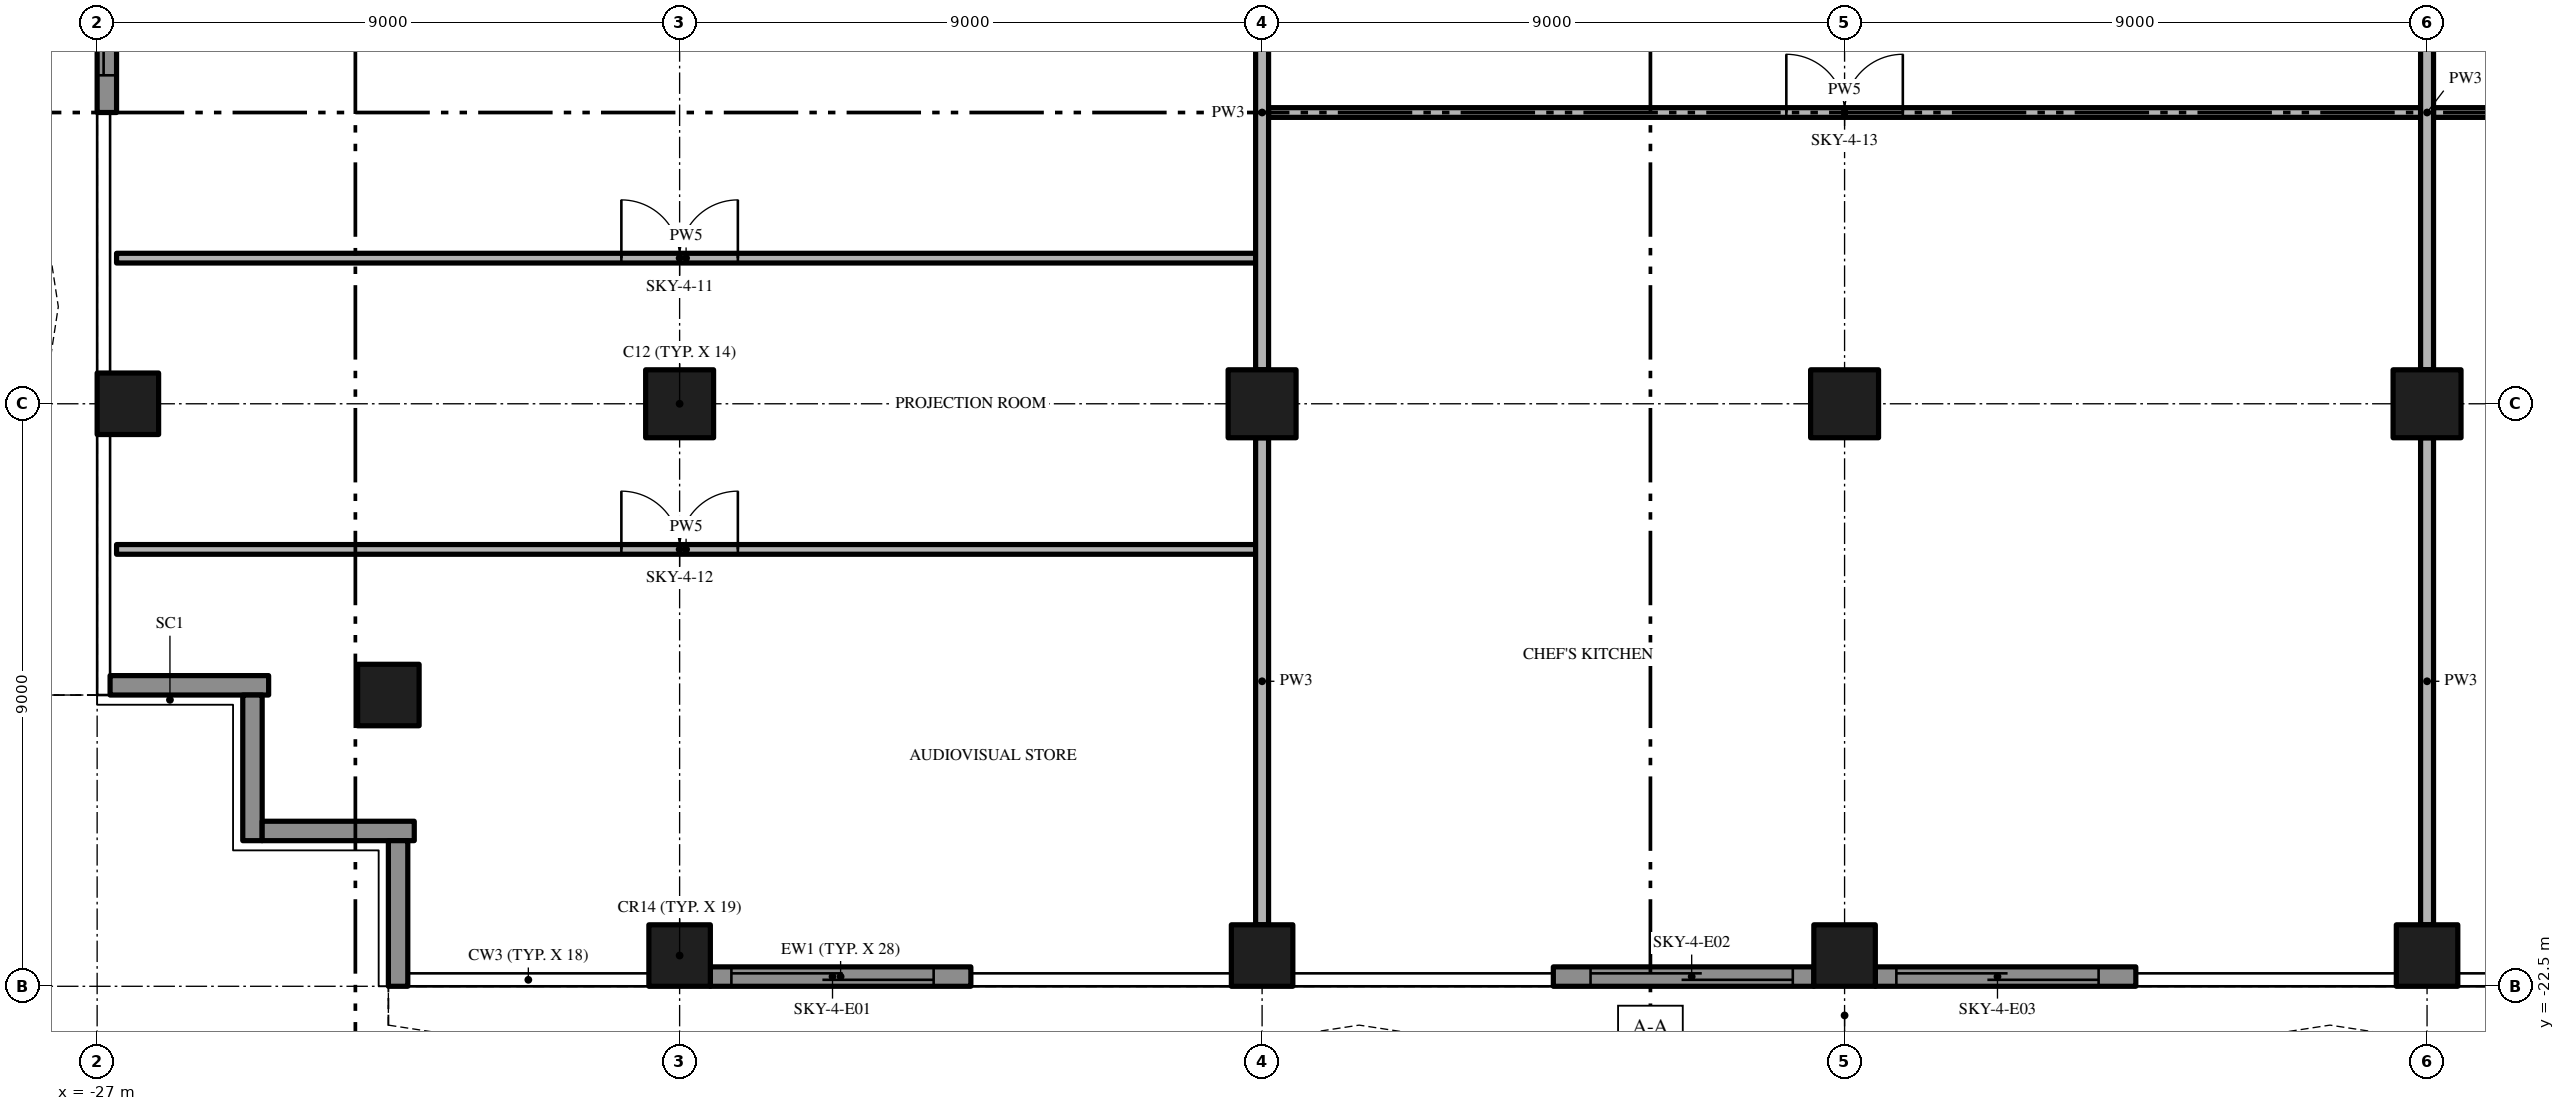
"""IFC4 building model, lengths in metres.
Left out: names, types, materials, properties, quantities, classifications, styles, units other than length and angle.
Written with IfcOpenShell. Run it as: python <this file> out.ifc"""

import sys

from ifc_helpers import new_model, si_unit, direction, frame, frame_2d, origin, origin_2d, place, context, subcontext, project, spatial, polyline, rectangle, outline, extrude, element, fill, save


model = new_model("IFC4")
c1 = context("Model", 3, precision=1e-05, world=origin(), true_north=direction((0.0, 1.0)))
c2 = subcontext(c1, "Body", "Model", "MODEL_VIEW")
j1 = project(units=[si_unit("LENGTHUNIT", "METRE"), si_unit("PLANEANGLEUNIT", "RADIAN")], contexts=[c1])
p1 = place(None, origin())
s1 = spatial("IfcSite", under=j1, at=p1, CompositionType="ELEMENT")
p2 = place(p1, origin())
s2 = spatial("IfcBuilding", under=s1, at=p2, CompositionType="ELEMENT")
p3 = place(p2, frame((0.0, 0.0, 233.8)))
s3 = spatial("IfcBuildingStorey", under=s2, at=p3, CompositionType="ELEMENT", Elevation=233.8)
p4 = place(p3, frame((-18.0, -13.5, 0.0), z_axis=(0.0, 0.0, 1.0), x_axis=(1.0, 0.0, 0.0)))
e1 = element("IfcColumn", 1, at=p4, inside=s3, PredefinedType="COLUMN", context=c2, shape_type="SweptSolid", body=[
    extrude(rectangle(XDim=1.05, YDim=1.05, at=origin_2d()), origin(), (0.0, 0.0, 1.0), 4.7),
])
for number, where, z_axis, x_axis in (
    (2, (-18.0, -22.025, 0.0), (0.0, 0.0, 1.0), (1.0, 0.0, 0.0)),
    (3, (-26.525, -13.5, 0.0), (0.0, 0.0, 1.0), (1.0, 0.0, 0.0)),
    (4, (-22.5, -18.0, 0.0), (0.0, 0.0, 1.0), (1.0, 0.0, 0.0)),
):
    element("IfcColumn", number, at=place(p3, frame(where, z_axis=z_axis, x_axis=x_axis)), inside=s3, PredefinedType="COLUMN", context=c2, shape_type="SweptSolid", body=[
        extrude(rectangle(XDim=0.95, YDim=0.95, at=origin_2d()), origin(), (0.0, 0.0, 1.0), 4.7),
    ])
p5 = place(p3, frame((-9.0, -13.5, 0.0), z_axis=(0.0, 0.0, 1.0), x_axis=(1.0, 0.0, 0.0)))
e5 = element("IfcColumn", 5, at=p5, inside=s3, PredefinedType="COLUMN", context=c2, shape_type="SweptSolid", body=[
    extrude(rectangle(XDim=1.05, YDim=1.05, at=origin_2d()), origin(), (0.0, 0.0, 1.0), 4.7),
])
p6 = place(p3, frame((-9.0, -22.025, 0.0), z_axis=(0.0, 0.0, 1.0), x_axis=(1.0, 0.0, 0.0)))
e6 = element("IfcColumn", 6, at=p6, inside=s3, PredefinedType="COLUMN", context=c2, shape_type="SweptSolid", body=[
    extrude(rectangle(XDim=0.95, YDim=0.95, at=origin_2d()), origin(), (0.0, 0.0, 1.0), 4.7),
])
p7 = place(p3, frame((0.0, -13.5, 0.0), z_axis=(0.0, 0.0, 1.0), x_axis=(1.0, 0.0, 0.0)))
e7 = element("IfcColumn", 7, at=p7, inside=s3, PredefinedType="COLUMN", context=c2, shape_type="SweptSolid", body=[
    extrude(rectangle(XDim=1.05, YDim=1.05, at=origin_2d()), origin(), (0.0, 0.0, 1.0), 4.7),
])
p8 = place(p3, frame((0.0, -22.025, 0.0), z_axis=(0.0, 0.0, 1.0), x_axis=(1.0, 0.0, 0.0)))
e8 = element("IfcColumn", 8, at=p8, inside=s3, PredefinedType="COLUMN", context=c2, shape_type="SweptSolid", body=[
    extrude(rectangle(XDim=0.95, YDim=0.95, at=origin_2d()), origin(), (0.0, 0.0, 1.0), 4.7),
])
p9 = place(p3, frame((9.0, -13.5, 0.0), z_axis=(0.0, 0.0, 1.0), x_axis=(1.0, 0.0, 0.0)))
e9 = element("IfcColumn", 9, at=p9, inside=s3, PredefinedType="COLUMN", context=c2, shape_type="SweptSolid", body=[
    extrude(rectangle(XDim=1.05, YDim=1.05, at=origin_2d()), origin(), (0.0, 0.0, 1.0), 4.7),
])
p10 = place(p3, frame((9.0, -22.025, 0.0), z_axis=(0.0, 0.0, 1.0), x_axis=(1.0, 0.0, 0.0)))
e10 = element("IfcColumn", 10, at=p10, inside=s3, PredefinedType="COLUMN", context=c2, shape_type="SweptSolid", body=[
    extrude(rectangle(XDim=0.95, YDim=0.95, at=origin_2d()), origin(), (0.0, 0.0, 1.0), 4.7),
])
p11 = place(p3, frame((-13.5, -22.35, 0.0), z_axis=(0.0, 0.0, 1.0), x_axis=(-1.0, 0.0, 0.0)))
e11 = element("IfcWall", 11, at=p11, inside=s3, PredefinedType="SOLIDWALL", context=c2, shape_type="SweptSolid", body=[
    extrude(rectangle(XDim=4.025, YDim=0.3, at=frame_2d((2.013, 0.0))), origin(), (0.0, 0.0, 1.0), 4.7),
])
p12 = place(p11, frame((0.575, 0.0, 0.0)))
e12 = element("IfcOpeningElement", 12, at=p12, cuts=e11, PredefinedType="OPENING", context=c2, shape_type="SweptSolid", body=[
    extrude(rectangle(XDim=3.125, YDim=2.4, at=frame_2d((1.562, 1.2))), frame((0.0, 0.16, 0.0), z_axis=(0.0, -1.0, 0.0), x_axis=(1.0, 0.0, 0.0)), (0.0, 0.0, 1.0), 0.32),
])
p13 = place(p3, frame((-0.475, -22.35, 0.0), z_axis=(0.0, 0.0, 1.0), x_axis=(-1.0, 0.0, 0.0)))
e13 = element("IfcWall", 13, at=p13, inside=s3, PredefinedType="SOLIDWALL", context=c2, shape_type="SweptSolid", body=[
    extrude(rectangle(XDim=4.025, YDim=0.3, at=frame_2d((2.013, 0.0))), origin(), (0.0, 0.0, 1.0), 4.7),
])
p14 = place(p13, frame((0.325, 0.0, 0.0)))
e14 = element("IfcOpeningElement", 14, at=p14, cuts=e13, PredefinedType="OPENING", context=c2, shape_type="SweptSolid", body=[
    extrude(rectangle(XDim=3.125, YDim=2.4, at=frame_2d((1.562, 1.2))), frame((0.0, 0.16, 0.0), z_axis=(0.0, -1.0, 0.0), x_axis=(1.0, 0.0, 0.0)), (0.0, 0.0, 1.0), 0.32),
])
p15 = place(p3, frame((4.5, -22.35, 0.0), z_axis=(0.0, 0.0, 1.0), x_axis=(-1.0, 0.0, 0.0)))
e15 = element("IfcWall", 15, at=p15, inside=s3, PredefinedType="SOLIDWALL", context=c2, shape_type="SweptSolid", body=[
    extrude(rectangle(XDim=4.025, YDim=0.3, at=frame_2d((2.013, 0.0))), origin(), (0.0, 0.0, 1.0), 4.7),
])
p16 = place(p15, frame((0.575, 0.0, 0.0)))
e16 = element("IfcOpeningElement", 16, at=p16, cuts=e15, PredefinedType="OPENING", context=c2, shape_type="SweptSolid", body=[
    extrude(rectangle(XDim=3.125, YDim=2.4, at=frame_2d((1.562, 1.2))), frame((0.0, 0.16, 0.0), z_axis=(0.0, -1.0, 0.0), x_axis=(1.0, 0.0, 0.0)), (0.0, 0.0, 1.0), 0.32),
])
p17 = place(p3, frame((-26.85, -9.0, 0.0), z_axis=(0.0, 0.0, 1.0), x_axis=(0.0, 1.0, 0.0)))
e17 = element("IfcWall", 17, at=p17, inside=s3, PredefinedType="SOLIDWALL", context=c2, shape_type="SweptSolid", body=[
    extrude(rectangle(XDim=4.025, YDim=0.3, at=frame_2d((2.013, 0.0))), origin(), (0.0, 0.0, 1.0), 4.7),
])
p18 = place(p17, frame((0.575, 0.0, 0.0)))
e18 = element("IfcOpeningElement", 18, at=p18, cuts=e17, PredefinedType="OPENING", context=c2, shape_type="SweptSolid", body=[
    extrude(rectangle(XDim=3.125, YDim=2.4, at=frame_2d((1.562, 1.2))), frame((0.0, 0.16, 0.0), z_axis=(0.0, -1.0, 0.0), x_axis=(1.0, 0.0, 0.0)), (0.0, 0.0, 1.0), 0.32),
])
p19 = place(p3, frame((-24.35, -17.85, 0.0), z_axis=(0.0, 0.0, 1.0), x_axis=(-1.0, 0.0, 0.0)))
e19 = element("IfcWall", 19, at=p19, inside=s3, PredefinedType="SOLIDWALL", context=c2, shape_type="SweptSolid", body=[
    extrude(rectangle(XDim=2.45, YDim=0.3, at=frame_2d((1.225, 0.0))), origin(), (0.0, 0.0, 1.0), 4.7),
])
p20 = place(p3, frame((-24.6, -20.25, 0.0), z_axis=(0.0, 0.0, 1.0), x_axis=(0.0, 1.0, 0.0)))
e20 = element("IfcWall", 20, at=p20, inside=s3, PredefinedType="SOLIDWALL", context=c2, shape_type="SweptSolid", body=[
    extrude(rectangle(XDim=2.25, YDim=0.3, at=frame_2d((1.125, 0.0))), origin(), (0.0, 0.0, 1.0), 4.7),
])
p21 = place(p3, frame((-22.1, -20.1, 0.0), z_axis=(0.0, 0.0, 1.0), x_axis=(-1.0, 0.0, 0.0)))
e21 = element("IfcWall", 21, at=p21, inside=s3, PredefinedType="SOLIDWALL", context=c2, shape_type="SweptSolid", body=[
    extrude(rectangle(XDim=2.35, YDim=0.3, at=frame_2d((1.175, 0.0))), origin(), (0.0, 0.0, 1.0), 4.7),
])
p22 = place(p3, frame((-22.35, -22.5, 0.0), z_axis=(0.0, 0.0, 1.0), x_axis=(0.0, 1.0, 0.0)))
e22 = element("IfcWall", 22, at=p22, inside=s3, PredefinedType="SOLIDWALL", context=c2, shape_type="SweptSolid", body=[
    extrude(rectangle(XDim=2.25, YDim=0.3, at=frame_2d((1.125, 0.0))), origin(), (0.0, 0.0, 1.0), 4.7),
])
p23 = place(p3, origin())
e23 = element("IfcWall", 23, at=p23, inside=s3, PredefinedType="USERDEFINED", context=c2, shape_type="SweptSolid", body=[
    extrude(outline(polyline([(-22.5, -23.1), (-21.0, -23.329), (-19.5, -23.929), (-18.0, -24.671), (-16.5, -25.271), (-15.0, -25.5), (-13.5, -25.271), (-12.0, -24.671), (-10.5, -23.929), (-9.0, -23.329), (-7.5, -23.1), (-6.0, -23.329), (-4.5, -23.929), (-3.0, -24.671), (-1.5, -25.271), (0.0, -25.5), (1.5, -25.271), (3.0, -24.671), (4.5, -23.929), (6.0, -23.329), (7.5, -23.1), (9.0, -23.329), (10.5, -23.929), (12.0, -24.671), (13.5, -25.271), (15.0, -25.5), (16.5, -25.271), (18.0, -24.671), (19.5, -23.929), (21.0, -23.329), (22.5, -23.1), (22.462, -22.853), (20.934, -23.086), (19.398, -23.701), (17.898, -24.442), (16.434, -25.028), (15.0, -25.247), (13.566, -25.028), (12.102, -24.442), (10.602, -23.701), (9.066, -23.086), (7.5, -22.847), (5.934, -23.086), (4.398, -23.701), (2.898, -24.442), (1.434, -25.028), (0.0, -25.247), (-1.434, -25.028), (-2.898, -24.442), (-4.398, -23.701), (-5.934, -23.086), (-7.5, -22.847), (-9.066, -23.086), (-10.602, -23.701), (-12.102, -24.442), (-13.566, -25.028), (-15.0, -25.247), (-16.434, -25.028), (-17.898, -24.442), (-19.398, -23.701), (-20.934, -23.086), (-22.462, -22.853), (-22.5, -23.1)])), origin(), (0.0, 0.0, 1.0), 0.9),
])
p24 = place(p3, origin())
e24 = element("IfcWall", 24, at=p24, inside=s3, PredefinedType="USERDEFINED", context=c2, shape_type="SweptSolid", body=[
    extrude(outline(polyline([(-27.6, 18.0), (-27.829, 16.5), (-28.429, 15.0), (-29.171, 13.5), (-29.771, 12.0), (-30.0, 10.5), (-29.771, 9.0), (-29.171, 7.5), (-28.429, 6.0), (-27.829, 4.5), (-27.6, 3.0), (-27.829, 1.5), (-28.429, 0.0), (-29.171, -1.5), (-29.771, -3.0), (-30.0, -4.5), (-29.771, -6.0), (-29.171, -7.5), (-28.429, -9.0), (-27.829, -10.5), (-27.6, -12.0), (-27.829, -13.5), (-28.429, -15.0), (-29.171, -16.5), (-29.771, -18.0), (-29.539, -18.093), (-28.942, -16.602), (-28.201, -15.102), (-27.586, -13.566), (-27.347, -12.0), (-27.586, -10.434), (-28.201, -8.898), (-28.942, -7.398), (-29.528, -5.934), (-29.747, -4.5), (-29.528, -3.066), (-28.942, -1.602), (-28.201, -0.102), (-27.586, 1.434), (-27.347, 3.0), (-27.586, 4.566), (-28.201, 6.102), (-28.942, 7.602), (-29.528, 9.066), (-29.747, 10.5), (-29.528, 11.934), (-28.942, 13.398), (-28.201, 14.898), (-27.586, 16.434), (-27.353, 17.962), (-27.6, 18.0)])), origin(), (0.0, 0.0, 1.0), 0.9),
])
p25 = place(p3, frame((-26.7, -15.75, 0.0), z_axis=(0.0, 0.0, 1.0), x_axis=(1.0, 0.0, 0.0)))
e25 = element("IfcWall", 25, at=p25, inside=s3, PredefinedType="PARTITIONING", context=c2, shape_type="SweptSolid", body=[
    extrude(rectangle(XDim=17.6, YDim=0.15, at=frame_2d((8.8, 0.0))), origin(), (0.0, 0.0, 1.0), 4.7),
])
p26 = place(p25, frame((7.8, 0.0, 0.0)))
e26 = element("IfcOpeningElement", 26, at=p26, cuts=e25, PredefinedType="OPENING", context=c2, shape_type="SweptSolid", body=[
    extrude(rectangle(XDim=1.8, YDim=2.4, at=frame_2d((0.9, 1.2))), frame((0.0, 0.085, 0.0), z_axis=(0.0, -1.0, 0.0), x_axis=(1.0, 0.0, 0.0)), (0.0, 0.0, 1.0), 0.17),
])
p27 = place(p3, frame((-26.7, -11.25, 0.0), z_axis=(0.0, 0.0, 1.0), x_axis=(1.0, 0.0, 0.0)))
e27 = element("IfcWall", 27, at=p27, inside=s3, PredefinedType="PARTITIONING", context=c2, shape_type="SweptSolid", body=[
    extrude(rectangle(XDim=17.6, YDim=0.15, at=frame_2d((8.8, 0.0))), origin(), (0.0, 0.0, 1.0), 4.7),
])
p28 = place(p27, frame((7.8, 0.0, 0.0)))
e28 = element("IfcOpeningElement", 28, at=p28, cuts=e27, PredefinedType="OPENING", context=c2, shape_type="SweptSolid", body=[
    extrude(rectangle(XDim=1.8, YDim=2.4, at=frame_2d((0.9, 1.2))), frame((0.0, 0.085, 0.0), z_axis=(0.0, -1.0, 0.0), x_axis=(1.0, 0.0, 0.0)), (0.0, 0.0, 1.0), 0.17),
])
p29 = place(p3, frame((-8.9, -9.0, 0.0), z_axis=(0.0, 0.0, 1.0), x_axis=(1.0, 0.0, 0.0)))
e29 = element("IfcWall", 29, at=p29, inside=s3, PredefinedType="PARTITIONING", context=c2, shape_type="SweptSolid", body=[
    extrude(rectangle(XDim=17.8, YDim=0.15, at=frame_2d((8.9, 0.0))), origin(), (0.0, 0.0, 1.0), 4.7),
])
p30 = place(p29, frame((8.0, 0.0, 0.0)))
e30 = element("IfcOpeningElement", 30, at=p30, cuts=e29, PredefinedType="OPENING", context=c2, shape_type="SweptSolid", body=[
    extrude(rectangle(XDim=1.8, YDim=2.4, at=frame_2d((0.9, 1.2))), frame((0.0, 0.085, 0.0), z_axis=(0.0, -1.0, 0.0), x_axis=(1.0, 0.0, 0.0)), (0.0, 0.0, 1.0), 0.17),
])
p31 = place(p3, frame((9.1, -9.0, 0.0), z_axis=(0.0, 0.0, 1.0), x_axis=(1.0, 0.0, 0.0)))
e31 = element("IfcWall", 31, at=p31, inside=s3, PredefinedType="PARTITIONING", context=c2, shape_type="SweptSolid", body=[
    extrude(rectangle(XDim=17.6, YDim=0.15, at=frame_2d((8.8, 0.0))), origin(), (0.0, 0.0, 1.0), 4.7),
])
p32 = place(p31, frame((8.0, 0.0, 0.0)))
e32 = element("IfcOpeningElement", 32, at=p32, cuts=e31, PredefinedType="OPENING", context=c2, shape_type="SweptSolid", body=[
    extrude(rectangle(XDim=1.8, YDim=2.4, at=frame_2d((0.9, 1.2))), frame((0.0, 0.085, 0.0), z_axis=(0.0, -1.0, 0.0), x_axis=(1.0, 0.0, 0.0)), (0.0, 0.0, 1.0), 0.17),
])
p33 = place(p3, frame((-9.0, -21.55, 0.0), z_axis=(0.0, 0.0, 1.0), x_axis=(0.0, 1.0, 0.0)))
e33 = element("IfcWall", 33, at=p33, inside=s3, PredefinedType="PARTITIONING", context=c2, shape_type="SweptSolid", body=[
    extrude(rectangle(XDim=7.525, YDim=0.2, at=frame_2d((3.763, 0.0))), origin(), (0.0, 0.0, 1.0), 4.7),
])
p34 = place(p3, frame((-9.0, -12.975, 0.0), z_axis=(0.0, 0.0, 1.0), x_axis=(0.0, 1.0, 0.0)))
e34 = element("IfcWall", 34, at=p34, inside=s3, PredefinedType="PARTITIONING", context=c2, shape_type="SweptSolid", body=[
    extrude(rectangle(XDim=7.95, YDim=0.2, at=frame_2d((3.975, 0.0))), origin(), (0.0, 0.0, 1.0), 4.7),
])
p35 = place(p3, frame((9.0, -21.55, 0.0), z_axis=(0.0, 0.0, 1.0), x_axis=(0.0, 1.0, 0.0)))
e35 = element("IfcWall", 35, at=p35, inside=s3, PredefinedType="PARTITIONING", context=c2, shape_type="SweptSolid", body=[
    extrude(rectangle(XDim=7.525, YDim=0.2, at=frame_2d((3.763, 0.0))), origin(), (0.0, 0.0, 1.0), 4.7),
])
p36 = place(p3, frame((9.0, -12.975, 0.0), z_axis=(0.0, 0.0, 1.0), x_axis=(0.0, 1.0, 0.0)))
e36 = element("IfcWall", 36, at=p36, inside=s3, PredefinedType="PARTITIONING", context=c2, shape_type="SweptSolid", body=[
    extrude(rectangle(XDim=7.95, YDim=0.2, at=frame_2d((3.975, 0.0))), origin(), (0.0, 0.0, 1.0), 4.7),
])
p37 = place(p12, origin())
e37 = element("IfcDoor", 37, at=p37, inside=s3, OperationType="SINGLE_SWING_LEFT", PredefinedType="DOOR", context=c2, shape_type="SweptSolid", body=[
    extrude(rectangle(XDim=3.125, YDim=2.4, at=frame_2d((1.562, 1.2))), frame((0.0, 0.025, 0.0), z_axis=(0.0, -1.0, 0.0), x_axis=(1.0, 0.0, 0.0)), (0.0, 0.0, 1.0), 0.05),
])
fill(e12, e37)
p38 = place(p14, origin())
e38 = element("IfcDoor", 38, at=p38, inside=s3, OperationType="SINGLE_SWING_LEFT", PredefinedType="DOOR", context=c2, shape_type="SweptSolid", body=[
    extrude(rectangle(XDim=3.125, YDim=2.4, at=frame_2d((1.562, 1.2))), frame((0.0, 0.025, 0.0), z_axis=(0.0, -1.0, 0.0), x_axis=(1.0, 0.0, 0.0)), (0.0, 0.0, 1.0), 0.05),
])
fill(e14, e38)
p39 = place(p16, origin())
e39 = element("IfcDoor", 39, at=p39, inside=s3, OperationType="SINGLE_SWING_LEFT", PredefinedType="DOOR", context=c2, shape_type="SweptSolid", body=[
    extrude(rectangle(XDim=3.125, YDim=2.4, at=frame_2d((1.562, 1.2))), frame((0.0, 0.025, 0.0), z_axis=(0.0, -1.0, 0.0), x_axis=(1.0, 0.0, 0.0)), (0.0, 0.0, 1.0), 0.05),
])
fill(e16, e39)
p40 = place(p18, origin())
e40 = element("IfcDoor", 40, at=p40, inside=s3, OperationType="SINGLE_SWING_LEFT", PredefinedType="DOOR", context=c2, shape_type="SweptSolid", body=[
    extrude(rectangle(XDim=3.125, YDim=2.4, at=frame_2d((1.562, 1.2))), frame((0.0, 0.025, 0.0), z_axis=(0.0, -1.0, 0.0), x_axis=(1.0, 0.0, 0.0)), (0.0, 0.0, 1.0), 0.05),
])
fill(e18, e40)
p41 = place(p28, origin())
e41 = element("IfcDoor", 41, at=p41, inside=s3, OperationType="DOUBLE_DOOR_SINGLE_SWING", PredefinedType="DOOR", context=c2, shape_type="SweptSolid", body=[
    extrude(rectangle(XDim=1.8, YDim=2.4, at=frame_2d((0.9, 1.2))), frame((0.0, 0.025, 0.0), z_axis=(0.0, -1.0, 0.0), x_axis=(1.0, 0.0, 0.0)), (0.0, 0.0, 1.0), 0.05),
])
fill(e28, e41)
p42 = place(p26, origin())
e42 = element("IfcDoor", 42, at=p42, inside=s3, OperationType="DOUBLE_DOOR_SINGLE_SWING", PredefinedType="DOOR", context=c2, shape_type="SweptSolid", body=[
    extrude(rectangle(XDim=1.8, YDim=2.4, at=frame_2d((0.9, 1.2))), frame((0.0, 0.025, 0.0), z_axis=(0.0, -1.0, 0.0), x_axis=(1.0, 0.0, 0.0)), (0.0, 0.0, 1.0), 0.05),
])
fill(e26, e42)
p43 = place(p30, origin())
e43 = element("IfcDoor", 43, at=p43, inside=s3, OperationType="DOUBLE_DOOR_SINGLE_SWING", PredefinedType="DOOR", context=c2, shape_type="SweptSolid", body=[
    extrude(rectangle(XDim=1.8, YDim=2.4, at=frame_2d((0.9, 1.2))), frame((0.0, 0.025, 0.0), z_axis=(0.0, -1.0, 0.0), x_axis=(1.0, 0.0, 0.0)), (0.0, 0.0, 1.0), 0.05),
])
fill(e30, e43)
save(model, sys.argv[1])
